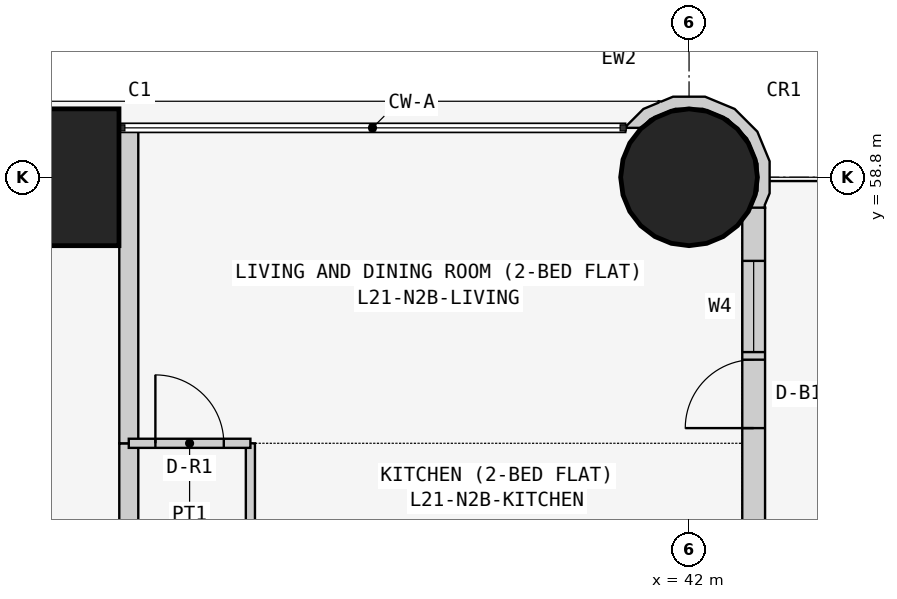
"""IFC4 building model, lengths in metres.
Left out: names, types, materials, properties, quantities, classifications, styles, units other than length and angle.
Written with IfcOpenShell. Run it as: python <this file> out.ifc"""

import sys

from ifc_helpers import new_model, si_unit, direction, frame, frame_2d, origin, origin_2d, place, context, subcontext, project, spatial, polyline, rectangle, circle, outline, extrude, element, fill, save


model = new_model("IFC4")
c1 = context("Model", 3, precision=1e-05, world=origin(), true_north=direction((0.0, 1.0)))
c2 = subcontext(c1, "Body", "Model", "MODEL_VIEW")
j1 = project(units=[si_unit("LENGTHUNIT", "METRE"), si_unit("PLANEANGLEUNIT", "RADIAN")], contexts=[c1])
p1 = place(None, origin())
s1 = spatial("IfcSite", under=j1, at=p1, CompositionType="ELEMENT")
p2 = place(p1, origin())
s2 = spatial("IfcBuilding", under=s1, at=p2, CompositionType="ELEMENT")
p3 = place(p2, frame((0.0, 0.0, 84.9)))
s3 = spatial("IfcBuildingStorey", under=s2, at=p3, CompositionType="ELEMENT", Elevation=84.9)
p4 = place(p3, frame((33.6, 58.8, 0.0), z_axis=(0.0, 0.0, 1.0), x_axis=(1.0, 0.0, 0.0)))
e1 = element("IfcColumn", 1, at=p4, inside=s3, PredefinedType="COLUMN", context=c2, shape_type="SweptSolid", body=[
    extrude(rectangle(XDim=1.8, YDim=1.8, at=origin_2d()), origin(), (0.0, 0.0, 1.0), 3.6),
])
p5 = place(p3, frame((42.0, 58.8, 0.0), z_axis=(0.0, 0.0, 1.0), x_axis=(1.0, 0.0, 0.0)))
e2 = element("IfcColumn", 2, at=p5, inside=s3, PredefinedType="COLUMN", context=c2, shape_type="SweptSolid", body=[
    extrude(circle(Radius=0.9, at=origin_2d()), origin(), (0.0, 0.0, 1.0), 3.6),
])
p6 = place(p3, frame((42.85, 43.0, 0.0), z_axis=(0.0, 0.0, 1.0), x_axis=(0.0, 1.0, 0.0)))
e3 = element("IfcWall", 3, at=p6, inside=s3, PredefinedType="SOLIDWALL", context=c2, shape_type="SweptSolid", body=[
    extrude(rectangle(XDim=15.4, YDim=0.3, at=frame_2d((7.7, 0.0))), origin(), (0.0, 0.0, 1.0), 3.45),
])
p7 = place(p6, frame((1.2, 0.0, 0.9)))
e4 = element("IfcOpeningElement", 4, at=p7, cuts=e3, PredefinedType="OPENING", context=c2, shape_type="SweptSolid", body=[
    extrude(rectangle(XDim=1.8, YDim=1.5, at=frame_2d((0.9, 0.75))), frame((0.0, 0.16, 0.0), z_axis=(0.0, -1.0, 0.0), x_axis=(1.0, 0.0, 0.0)), (0.0, 0.0, 1.0), 0.32),
])
p8 = place(p6, frame((4.95, 0.0, 1.5)))
e5 = element("IfcOpeningElement", 5, at=p8, cuts=e3, PredefinedType="OPENING", context=c2, shape_type="SweptSolid", body=[
    extrude(rectangle(XDim=0.9, YDim=0.7, at=frame_2d((0.45, 0.35))), frame((0.0, 0.16, 0.0), z_axis=(0.0, -1.0, 0.0), x_axis=(1.0, 0.0, 0.0)), (0.0, 0.0, 1.0), 0.32),
])
p9 = place(p6, frame((8.5, 0.0, 0.9)))
e6 = element("IfcOpeningElement", 6, at=p9, cuts=e3, PredefinedType="OPENING", context=c2, shape_type="SweptSolid", body=[
    extrude(rectangle(XDim=1.8, YDim=1.5, at=frame_2d((0.9, 0.75))), frame((0.0, 0.16, 0.0), z_axis=(0.0, -1.0, 0.0), x_axis=(1.0, 0.0, 0.0)), (0.0, 0.0, 1.0), 0.32),
])
p10 = place(p6, frame((12.5, 0.0, 0.0)))
e7 = element("IfcOpeningElement", 7, at=p10, cuts=e3, PredefinedType="OPENING", context=c2, shape_type="SweptSolid", body=[
    extrude(rectangle(XDim=0.9, YDim=2.4, at=frame_2d((0.45, 1.2))), frame((0.0, 0.16, 0.0), z_axis=(0.0, -1.0, 0.0), x_axis=(1.0, 0.0, 0.0)), (0.0, 0.0, 1.0), 0.32),
])
p11 = place(p6, frame((13.5, 0.0, 0.9)))
e8 = element("IfcOpeningElement", 8, at=p11, cuts=e3, PredefinedType="OPENING", context=c2, shape_type="SweptSolid", body=[
    extrude(rectangle(XDim=1.2, YDim=1.5, at=frame_2d((0.6, 0.75))), frame((0.0, 0.16, 0.0), z_axis=(0.0, -1.0, 0.0), x_axis=(1.0, 0.0, 0.0)), (0.0, 0.0, 1.0), 0.32),
])
p12 = place(p3, frame((42.91, 58.436, 0.0), z_axis=(0.0, 0.0, 1.0), x_axis=(0.377204953059, 0.926129809145, 0.0)))
e9 = element("IfcWall", 9, at=p12, inside=s3, PredefinedType="SOLIDWALL", context=c2, shape_type="SweptSolid", body=[
    extrude(outline(polyline([(0.769, 1.728), (0.75, 1.723), (0.6, 1.875), (0.295, 2.004), (0.281, 1.998), (0.36, 1.803), (0.509, 1.741), (0.761, 1.486), (0.896, 1.154), (0.894, 0.795), (0.755, 0.465), (0.5, 0.213), (0.168, 0.078), (-0.1, 0.08), (0.001, -0.097), (0.03, -0.08), (0.198, -0.081), (0.589, 0.078), (0.889, 0.374), (1.052, 0.763), (1.055, 1.185), (0.896, 1.575), (0.778, 1.695), (0.769, 1.728)])), origin(), (0.0, 0.0, 1.0), 3.45),
])
p13 = place(p3, frame((34.629, 55.3, 0.0), z_axis=(0.0, 0.0, 1.0), x_axis=(0.0, -1.0, 0.0)))
e10 = element("IfcWall", 10, at=p13, inside=s3, PredefinedType="PARTITIONING", context=c2, shape_type="SweptSolid", body=[
    extrude(rectangle(XDim=6.3, YDim=0.25, at=frame_2d((3.15, 0.0))), origin(), (0.0, 0.0, 1.0), 3.45),
])
p14 = place(p3, frame((34.629, 59.45, 0.0), z_axis=(0.0, 0.0, 1.0), x_axis=(0.0, -1.0, 0.0)))
e11 = element("IfcWall", 11, at=p14, inside=s3, PredefinedType="PARTITIONING", context=c2, shape_type="SweptSolid", body=[
    extrude(rectangle(XDim=4.15, YDim=0.25, at=frame_2d((2.075, 0.0))), origin(), (0.0, 0.0, 1.0), 3.45),
])
p15 = place(p3, frame((36.229, 55.3, 0.0), z_axis=(0.0, 0.0, 1.0), x_axis=(0.0, -1.0, 0.0)))
e12 = element("IfcWall", 12, at=p15, inside=s3, PredefinedType="PARTITIONING", context=c2, shape_type="SweptSolid", body=[
    extrude(rectangle(XDim=1.2, YDim=0.12, at=frame_2d((0.6, 0.0))), origin(), (0.0, 0.0, 1.0), 3.45),
])
p16 = place(p3, frame((34.629, 55.3, 0.0), z_axis=(0.0, 0.0, 1.0), x_axis=(1.0, 0.0, 0.0)))
e13 = element("IfcWall", 13, at=p16, inside=s3, PredefinedType="PARTITIONING", context=c2, shape_type="SweptSolid", body=[
    extrude(rectangle(XDim=1.6, YDim=0.12, at=frame_2d((0.8, 0.0))), origin(), (0.0, 0.0, 1.0), 3.45),
])
p17 = place(p16, frame((0.35, 0.0, 0.0)))
e14 = element("IfcOpeningElement", 14, at=p17, cuts=e13, PredefinedType="OPENING", context=c2, shape_type="SweptSolid", body=[
    extrude(rectangle(XDim=0.9, YDim=2.1, at=frame_2d((0.45, 1.05))), frame((0.0, 0.07, 0.0), z_axis=(0.0, -1.0, 0.0), x_axis=(1.0, 0.0, 0.0)), (0.0, 0.0, 1.0), 0.14),
])
p18 = place(p10, origin())
e15 = element("IfcDoor", 15, at=p18, inside=s3, OperationType="SINGLE_SWING_LEFT", PredefinedType="DOOR", context=c2, shape_type="SweptSolid", body=[
    extrude(rectangle(XDim=0.9, YDim=2.4, at=frame_2d((0.45, 1.2))), frame((0.0, 0.025, 0.0), z_axis=(0.0, -1.0, 0.0), x_axis=(1.0, 0.0, 0.0)), (0.0, 0.0, 1.0), 0.05),
])
fill(e7, e15)
p19 = place(p11, origin())
e16 = element("IfcWindow", 16, at=p19, inside=s3, PartitioningType="SINGLE_PANEL", PredefinedType="WINDOW", context=c2, shape_type="SweptSolid", body=[
    extrude(rectangle(XDim=1.2, YDim=1.5, at=frame_2d((0.6, 0.75))), frame((0.0, 0.03, 0.0), z_axis=(0.0, -1.0, 0.0), x_axis=(1.0, 0.0, 0.0)), (0.0, 0.0, 1.0), 0.06),
])
fill(e8, e16)
p20 = place(p17, origin())
e17 = element("IfcDoor", 17, at=p20, inside=s3, OperationType="SINGLE_SWING_LEFT", PredefinedType="DOOR", context=c2, shape_type="SweptSolid", body=[
    extrude(rectangle(XDim=0.9, YDim=2.1, at=frame_2d((0.45, 1.05))), frame((0.0, 0.025, 0.0), z_axis=(0.0, -1.0, 0.0), x_axis=(1.0, 0.0, 0.0)), (0.0, 0.0, 1.0), 0.05),
])
fill(e14, e17)
save(model, sys.argv[1])
